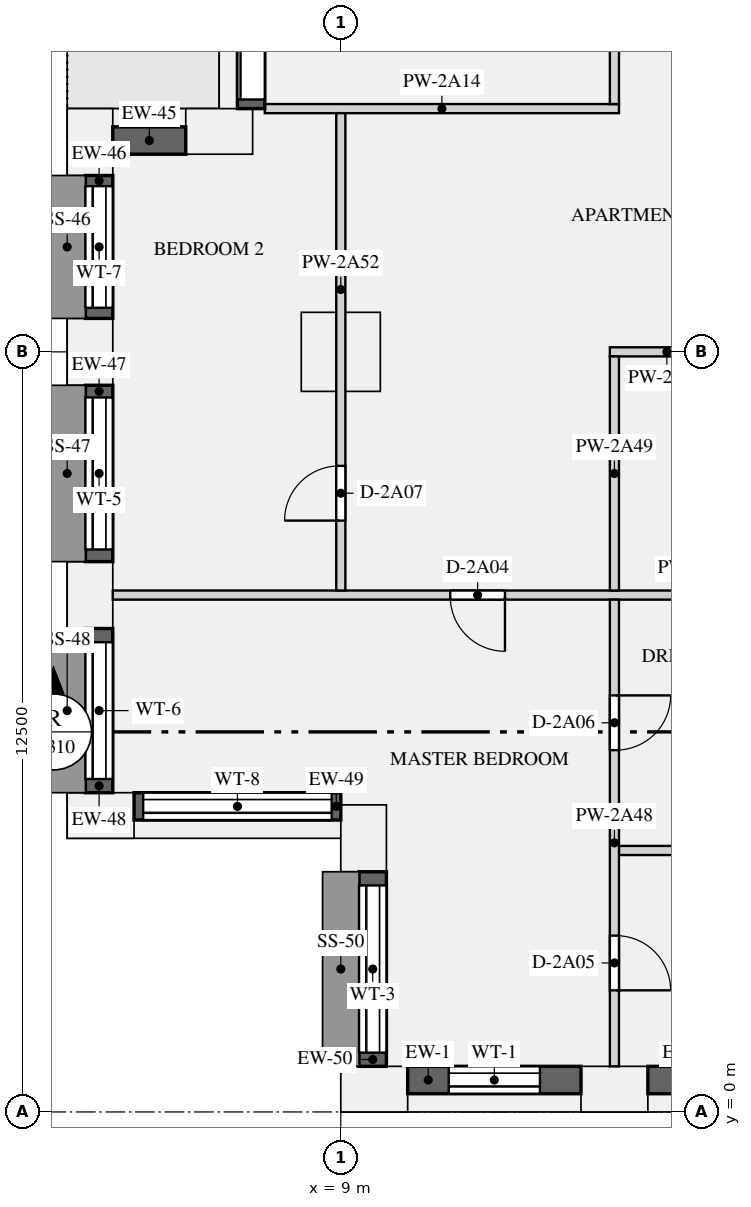
"""IFC4 building model, lengths in metres.
Left out: names, types, materials, properties, quantities, classifications, styles, units other than length and angle.
Written with IfcOpenShell. Run it as: python <this file> out.ifc"""

import sys

from ifc_helpers import new_model, si_unit, direction, frame, frame_2d, origin, origin_2d, place, context, subcontext, project, spatial, rectangle, extrude, element, fill, save


model = new_model("IFC4")
c1 = context("Model", 3, precision=1e-05, world=origin(), true_north=direction((0.0, 1.0)))
c2 = subcontext(c1, "Body", "Model", "MODEL_VIEW")
j1 = project(units=[si_unit("LENGTHUNIT", "METRE"), si_unit("PLANEANGLEUNIT", "RADIAN")], contexts=[c1])
p1 = place(None, origin())
s1 = spatial("IfcSite", under=j1, at=p1, CompositionType="ELEMENT")
p2 = place(p1, origin())
s2 = spatial("IfcBuilding", under=s1, at=p2, CompositionType="ELEMENT")
p3 = place(p2, frame((0.0, 0.0, 83.55)))
s3 = spatial("IfcBuildingStorey", under=s2, at=p3, CompositionType="ELEMENT", Elevation=83.55)
for number, where, z_axis, x_axis in (
    (1, (9.55, 0.375, 0.0), (0.0, 0.0, 1.0), (1.0, 0.0, 0.0)),
    (2, (13.5, 0.375, 0.0), (0.0, 0.0, 1.0), (1.0, 0.0, 0.0)),
    (3, (7.0, 16.125, 0.0), (0.0, 0.0, 1.0), (-1.0, 0.0, 0.0)),
    (4, (4.875, 15.95, 0.0), (0.0, 0.0, 1.0), (0.0, -1.0, 0.0)),
    (5, (4.875, 12.5, 0.0), (0.0, 0.0, 1.0), (0.0, -1.0, 0.0)),
    (6, (4.875, 8.5, 0.0), (0.0, 0.0, 1.0), (0.0, -1.0, 0.0)),
    (7, (5.05, 4.875, 0.0), (0.0, 0.0, 1.0), (1.0, 0.0, 0.0)),
    (8, (9.375, 4.5, 0.0), (0.0, 0.0, 1.0), (0.0, -1.0, 0.0)),
):
    element("IfcColumn", number, at=place(p3, frame(where, z_axis=z_axis, x_axis=x_axis)), inside=s3, PredefinedType="USERDEFINED", context=c2, shape_type="SweptSolid", body=[
        extrude(rectangle(XDim=1.1, YDim=0.75, at=origin_2d()), origin(), (0.0, 0.0, 1.0), 3.15),
    ])
p4 = place(p3, frame((9.0, 12.5, 0.0), z_axis=(0.0, 0.0, 1.0), x_axis=(1.0, 0.0, 0.0)))
e9 = element("IfcColumn", 9, at=p4, inside=s3, PredefinedType="COLUMN", context=c2, shape_type="SweptSolid", body=[
    extrude(rectangle(XDim=1.3, YDim=1.3, at=origin_2d()), origin(), (0.0, 0.0, 1.0), 3.15),
])
p5 = place(p3, frame((10.1, 0.525, 0.9), z_axis=(0.0, 0.0, 1.0), x_axis=(1.0, 0.0, 0.0)))
e10 = element("IfcWall", 10, at=p5, inside=s3, PredefinedType="SOLIDWALL", context=c2, shape_type="SweptSolid", body=[
    extrude(rectangle(XDim=2.85, YDim=0.45, at=frame_2d((1.425, 0.0))), origin(), (0.0, 0.0, 1.0), 1.93),
])
p6 = place(p5, frame((0.675, 0.0, 0.15)))
e11 = element("IfcOpeningElement", 11, at=p6, cuts=e10, PredefinedType="OPENING", context=c2, shape_type="SweptSolid", body=[
    extrude(rectangle(XDim=1.5, YDim=1.5, at=frame_2d((0.75, 0.75))), frame((0.0, 0.235, 0.0), z_axis=(0.0, -1.0, 0.0), x_axis=(1.0, 0.0, 0.0)), (0.0, 0.0, 1.0), 0.47),
])
p7 = place(p3, frame((14.05, 0.525, 0.9), z_axis=(0.0, 0.0, 1.0), x_axis=(1.0, 0.0, 0.0)))
e12 = element("IfcWall", 12, at=p7, inside=s3, PredefinedType="SOLIDWALL", context=c2, shape_type="SweptSolid", body=[
    extrude(rectangle(XDim=3.95, YDim=0.45, at=frame_2d((1.975, 0.0))), origin(), (0.0, 0.0, 1.0), 1.93),
])
p8 = place(p7, frame((1.225, 0.0, 0.15)))
e13 = element("IfcOpeningElement", 13, at=p8, cuts=e12, PredefinedType="OPENING", context=c2, shape_type="SweptSolid", body=[
    extrude(rectangle(XDim=1.5, YDim=1.5, at=frame_2d((0.75, 0.75))), frame((0.0, 0.235, 0.0), z_axis=(0.0, -1.0, 0.0), x_axis=(1.0, 0.0, 0.0)), (0.0, 0.0, 1.0), 0.47),
])
p9 = place(p3, frame((7.525, 19.95, 0.0), z_axis=(0.0, 0.0, 1.0), x_axis=(0.0, -1.0, 0.0)))
e14 = element("IfcWall", 14, at=p9, inside=s3, PredefinedType="SOLIDWALL", context=c2, shape_type="SweptSolid", body=[
    extrude(rectangle(XDim=3.45, YDim=0.45, at=frame_2d((1.725, 0.0))), origin(), (0.0, 0.0, 1.0), 2.83),
])
p10 = place(p9, frame((0.15, 0.0, 0.0)))
e15 = element("IfcOpeningElement", 15, at=p10, cuts=e14, PredefinedType="OPENING", context=c2, shape_type="SweptSolid", body=[
    extrude(rectangle(XDim=3.15, YDim=2.3, at=frame_2d((1.575, 1.15))), frame((0.0, 0.235, 0.0), z_axis=(0.0, -1.0, 0.0), x_axis=(1.0, 0.0, 0.0)), (0.0, 0.0, 1.0), 0.47),
])
p11 = place(p3, frame((6.45, 15.975, 0.9), z_axis=(0.0, 0.0, 1.0), x_axis=(-1.0, 0.0, 0.0)))
e16 = element("IfcWall", 16, at=p11, inside=s3, PredefinedType="SOLIDWALL", context=c2, shape_type="SweptSolid", body=[
    extrude(rectangle(XDim=1.2, YDim=0.45, at=frame_2d((0.6, 0.0))), origin(), (0.0, 0.0, 1.0), 1.93),
])
p12 = place(p3, frame((5.025, 15.4, 0.9), z_axis=(0.0, 0.0, 1.0), x_axis=(0.0, -1.0, 0.0)))
e17 = element("IfcWall", 17, at=p12, inside=s3, PredefinedType="SOLIDWALL", context=c2, shape_type="SweptSolid", body=[
    extrude(rectangle(XDim=2.35, YDim=0.45, at=frame_2d((1.175, 0.0))), origin(), (0.0, 0.0, 1.0), 1.93),
])
p13 = place(p12, frame((0.175, 0.0, 0.15)))
e18 = element("IfcOpeningElement", 18, at=p13, cuts=e17, PredefinedType="OPENING", context=c2, shape_type="SweptSolid", body=[
    extrude(rectangle(XDim=2.0, YDim=1.5, at=frame_2d((1.0, 0.75))), frame((0.0, 0.235, 0.0), z_axis=(0.0, -1.0, 0.0), x_axis=(1.0, 0.0, 0.0)), (0.0, 0.0, 1.0), 0.47),
])
p14 = place(p3, frame((5.025, 11.95, 0.9), z_axis=(0.0, 0.0, 1.0), x_axis=(0.0, -1.0, 0.0)))
e19 = element("IfcWall", 19, at=p14, inside=s3, PredefinedType="SOLIDWALL", context=c2, shape_type="SweptSolid", body=[
    extrude(rectangle(XDim=2.9, YDim=0.45, at=frame_2d((1.45, 0.0))), origin(), (0.0, 0.0, 1.0), 1.93),
])
p15 = place(p14, frame((0.2, 0.0, 0.15)))
e20 = element("IfcOpeningElement", 20, at=p15, cuts=e19, PredefinedType="OPENING", context=c2, shape_type="SweptSolid", body=[
    extrude(rectangle(XDim=2.5, YDim=1.5, at=frame_2d((1.25, 0.75))), frame((0.0, 0.235, 0.0), z_axis=(0.0, -1.0, 0.0), x_axis=(1.0, 0.0, 0.0)), (0.0, 0.0, 1.0), 0.47),
])
p16 = place(p3, frame((5.025, 7.95, 0.9), z_axis=(0.0, 0.0, 1.0), x_axis=(0.0, -1.0, 0.0)))
e21 = element("IfcWall", 21, at=p16, inside=s3, PredefinedType="SOLIDWALL", context=c2, shape_type="SweptSolid", body=[
    extrude(rectangle(XDim=2.7, YDim=0.45, at=frame_2d((1.35, 0.0))), origin(), (0.0, 0.0, 1.0), 1.93),
])
p17 = place(p16, frame((0.225, 0.0, 0.15)))
e22 = element("IfcOpeningElement", 22, at=p17, cuts=e21, PredefinedType="OPENING", context=c2, shape_type="SweptSolid", body=[
    extrude(rectangle(XDim=2.25, YDim=1.5, at=frame_2d((1.125, 0.75))), frame((0.0, 0.235, 0.0), z_axis=(0.0, -1.0, 0.0), x_axis=(1.0, 0.0, 0.0)), (0.0, 0.0, 1.0), 0.47),
])
p18 = place(p3, frame((5.6, 5.025, 0.9), z_axis=(0.0, 0.0, 1.0), x_axis=(1.0, 0.0, 0.0)))
e23 = element("IfcWall", 23, at=p18, inside=s3, PredefinedType="SOLIDWALL", context=c2, shape_type="SweptSolid", body=[
    extrude(rectangle(XDim=3.4, YDim=0.45, at=frame_2d((1.7, 0.0))), origin(), (0.0, 0.0, 1.0), 1.93),
])
p19 = place(p18, frame((0.15, 0.0, 0.15)))
e24 = element("IfcOpeningElement", 24, at=p19, cuts=e23, PredefinedType="OPENING", context=c2, shape_type="SweptSolid", body=[
    extrude(rectangle(XDim=3.1, YDim=1.5, at=frame_2d((1.55, 0.75))), frame((0.0, 0.235, 0.0), z_axis=(0.0, -1.0, 0.0), x_axis=(1.0, 0.0, 0.0)), (0.0, 0.0, 1.0), 0.47),
])
p20 = place(p3, frame((9.525, 3.95, 0.9), z_axis=(0.0, 0.0, 1.0), x_axis=(0.0, -1.0, 0.0)))
e25 = element("IfcWall", 25, at=p20, inside=s3, PredefinedType="SOLIDWALL", context=c2, shape_type="SweptSolid", body=[
    extrude(rectangle(XDim=3.2, YDim=0.45, at=frame_2d((1.6, 0.0))), origin(), (0.0, 0.0, 1.0), 1.93),
])
p21 = place(p20, frame((0.225, 0.0, 0.15)))
e26 = element("IfcOpeningElement", 26, at=p21, cuts=e25, PredefinedType="OPENING", context=c2, shape_type="SweptSolid", body=[
    extrude(rectangle(XDim=2.75, YDim=1.5, at=frame_2d((1.375, 0.75))), frame((0.0, 0.235, 0.0), z_axis=(0.0, -1.0, 0.0), x_axis=(1.0, 0.0, 0.0)), (0.0, 0.0, 1.0), 0.47),
])
p22 = place(p3, frame((5.25, 8.5, 0.0), z_axis=(0.0, 0.0, 1.0), x_axis=(1.0, 0.0, 0.0)))
e27 = element("IfcWall", 27, at=p22, inside=s3, PredefinedType="PARTITIONING", context=c2, shape_type="SweptSolid", body=[
    extrude(rectangle(XDim=12.75, YDim=0.15, at=frame_2d((6.375, 0.0))), origin(), (0.0, 0.0, 1.0), 2.83),
])
p23 = place(p22, frame((5.55, 0.0, 0.0)))
e28 = element("IfcOpeningElement", 28, at=p23, cuts=e27, PredefinedType="OPENING", context=c2, shape_type="SweptSolid", body=[
    extrude(rectangle(XDim=0.9, YDim=2.1, at=frame_2d((0.45, 1.05))), frame((0.0, 0.085, 0.0), z_axis=(0.0, -1.0, 0.0), x_axis=(1.0, 0.0, 0.0)), (0.0, 0.0, 1.0), 0.17),
])
p24 = place(p3, frame((13.575, 4.3, 0.0), z_axis=(0.0, 0.0, 1.0), x_axis=(1.0, 0.0, 0.0)))
e29 = element("IfcWall", 29, at=p24, inside=s3, PredefinedType="PARTITIONING", context=c2, shape_type="SweptSolid", body=[
    extrude(rectangle(XDim=4.425, YDim=0.15, at=frame_2d((2.212, 0.0))), origin(), (0.0, 0.0, 1.0), 2.83),
])
p25 = place(p3, frame((7.75, 16.5, 0.0), z_axis=(0.0, 0.0, 1.0), x_axis=(1.0, 0.0, 0.0)))
e30 = element("IfcWall", 30, at=p25, inside=s3, PredefinedType="PARTITIONING", context=c2, shape_type="SweptSolid", body=[
    extrude(rectangle(XDim=5.825, YDim=0.15, at=frame_2d((2.913, 0.0))), origin(), (0.0, 0.0, 1.0), 2.83),
])
p26 = place(p3, frame((13.425, 12.5, 0.0), z_axis=(0.0, 0.0, 1.0), x_axis=(1.0, 0.0, 0.0)))
e31 = element("IfcWall", 31, at=p26, inside=s3, PredefinedType="PARTITIONING", context=c2, shape_type="SweptSolid", body=[
    extrude(rectangle(XDim=4.575, YDim=0.15, at=frame_2d((2.288, 0.0))), origin(), (0.0, 0.0, 1.0), 2.83),
])
p27 = place(p26, frame((1.875, 0.0, 0.0)))
e32 = element("IfcOpeningElement", 32, at=p27, cuts=e31, PredefinedType="OPENING", context=c2, shape_type="SweptSolid", body=[
    extrude(rectangle(XDim=0.9, YDim=2.1, at=frame_2d((0.45, 1.05))), frame((0.0, 0.085, 0.0), z_axis=(0.0, -1.0, 0.0), x_axis=(1.0, 0.0, 0.0)), (0.0, 0.0, 1.0), 0.17),
])
p28 = place(p3, frame((13.5, 0.75, 0.0), z_axis=(0.0, 0.0, 1.0), x_axis=(0.0, 1.0, 0.0)))
e33 = element("IfcWall", 33, at=p28, inside=s3, PredefinedType="PARTITIONING", context=c2, shape_type="SweptSolid", body=[
    extrude(rectangle(XDim=7.675, YDim=0.15, at=frame_2d((3.837, 0.0))), origin(), (0.0, 0.0, 1.0), 2.83),
])
p29 = place(p28, frame((1.25, 0.0, 0.0)))
e34 = element("IfcOpeningElement", 34, at=p29, cuts=e33, PredefinedType="OPENING", context=c2, shape_type="SweptSolid", body=[
    extrude(rectangle(XDim=0.9, YDim=2.1, at=frame_2d((0.45, 1.05))), frame((0.0, 0.085, 0.0), z_axis=(0.0, -1.0, 0.0), x_axis=(1.0, 0.0, 0.0)), (0.0, 0.0, 1.0), 0.17),
])
p30 = place(p28, frame((5.2, 0.0, 0.0)))
e35 = element("IfcOpeningElement", 35, at=p30, cuts=e33, PredefinedType="OPENING", context=c2, shape_type="SweptSolid", body=[
    extrude(rectangle(XDim=0.9, YDim=2.1, at=frame_2d((0.45, 1.05))), frame((0.0, 0.085, 0.0), z_axis=(0.0, -1.0, 0.0), x_axis=(1.0, 0.0, 0.0)), (0.0, 0.0, 1.0), 0.17),
])
p31 = place(p3, frame((13.5, 8.575, 0.0), z_axis=(0.0, 0.0, 1.0), x_axis=(0.0, 1.0, 0.0)))
e36 = element("IfcWall", 36, at=p31, inside=s3, PredefinedType="PARTITIONING", context=c2, shape_type="SweptSolid", body=[
    extrude(rectangle(XDim=3.85, YDim=0.15, at=frame_2d((1.925, 0.0))), origin(), (0.0, 0.0, 1.0), 2.83),
])
p32 = place(p3, frame((13.5, 16.575, 0.0), z_axis=(0.0, 0.0, 1.0), x_axis=(0.0, 1.0, 0.0)))
e37 = element("IfcWall", 37, at=p32, inside=s3, PredefinedType="PARTITIONING", context=c2, shape_type="SweptSolid", body=[
    extrude(rectangle(XDim=6.325, YDim=0.15, at=frame_2d((3.163, 0.0))), origin(), (0.0, 0.0, 1.0), 2.83),
])
p33 = place(p32, frame((2.45, 0.0, 0.0)))
e38 = element("IfcOpeningElement", 38, at=p33, cuts=e37, PredefinedType="OPENING", context=c2, shape_type="SweptSolid", body=[
    extrude(rectangle(XDim=1.5, YDim=2.1, at=frame_2d((0.75, 1.05))), frame((0.0, 0.085, 0.0), z_axis=(0.0, -1.0, 0.0), x_axis=(1.0, 0.0, 0.0)), (0.0, 0.0, 1.0), 0.17),
])
p34 = place(p3, frame((9.0, 8.575, 0.0), z_axis=(0.0, 0.0, 1.0), x_axis=(0.0, 1.0, 0.0)))
e39 = element("IfcWall", 39, at=p34, inside=s3, PredefinedType="PARTITIONING", context=c2, shape_type="SweptSolid", body=[
    extrude(rectangle(XDim=7.85, YDim=0.15, at=frame_2d((3.925, 0.0))), origin(), (0.0, 0.0, 1.0), 2.83),
])
p35 = place(p34, frame((1.15, 0.0, 0.0)))
e40 = element("IfcOpeningElement", 40, at=p35, cuts=e39, PredefinedType="OPENING", context=c2, shape_type="SweptSolid", body=[
    extrude(rectangle(XDim=0.9, YDim=2.1, at=frame_2d((0.45, 1.05))), frame((0.0, 0.085, 0.0), z_axis=(0.0, -1.0, 0.0), x_axis=(1.0, 0.0, 0.0)), (0.0, 0.0, 1.0), 0.17),
])
p36 = place(p6, origin())
e41 = element("IfcWindow", 41, at=p36, inside=s3, PartitioningType="SINGLE_PANEL", PredefinedType="WINDOW", context=c2, shape_type="SweptSolid", body=[
    extrude(rectangle(XDim=1.5, YDim=1.5, at=frame_2d((0.75, 0.75))), frame((0.0, -0.065, 0.0), z_axis=(0.0, -1.0, 0.0), x_axis=(1.0, 0.0, 0.0)), (0.0, 0.0, 1.0), 0.06),
])
fill(e11, e41)
p37 = place(p10, origin())
e42 = element("IfcDoor", 42, at=p37, inside=s3, OperationType="SLIDING_TO_LEFT", PredefinedType="DOOR", context=c2, shape_type="SweptSolid", body=[
    extrude(rectangle(XDim=3.15, YDim=2.3, at=frame_2d((1.575, 1.15))), frame((0.0, -0.07, 0.0), z_axis=(0.0, -1.0, 0.0), x_axis=(1.0, 0.0, 0.0)), (0.0, 0.0, 1.0), 0.05),
])
fill(e15, e42)
p38 = place(p13, origin())
e43 = element("IfcWindow", 43, at=p38, inside=s3, PartitioningType="SINGLE_PANEL", PredefinedType="WINDOW", context=c2, shape_type="SweptSolid", body=[
    extrude(rectangle(XDim=2.0, YDim=1.5, at=frame_2d((1.0, 0.75))), frame((0.0, -0.065, 0.0), z_axis=(0.0, -1.0, 0.0), x_axis=(1.0, 0.0, 0.0)), (0.0, 0.0, 1.0), 0.06),
])
fill(e18, e43)
p39 = place(p15, origin())
e44 = element("IfcWindow", 44, at=p39, inside=s3, PartitioningType="SINGLE_PANEL", PredefinedType="WINDOW", context=c2, shape_type="SweptSolid", body=[
    extrude(rectangle(XDim=2.5, YDim=1.5, at=frame_2d((1.25, 0.75))), frame((0.0, -0.065, 0.0), z_axis=(0.0, -1.0, 0.0), x_axis=(1.0, 0.0, 0.0)), (0.0, 0.0, 1.0), 0.06),
])
fill(e20, e44)
p40 = place(p17, origin())
e45 = element("IfcWindow", 45, at=p40, inside=s3, PartitioningType="SINGLE_PANEL", PredefinedType="WINDOW", context=c2, shape_type="SweptSolid", body=[
    extrude(rectangle(XDim=2.25, YDim=1.5, at=frame_2d((1.125, 0.75))), frame((0.0, -0.065, 0.0), z_axis=(0.0, -1.0, 0.0), x_axis=(1.0, 0.0, 0.0)), (0.0, 0.0, 1.0), 0.06),
])
fill(e22, e45)
p41 = place(p19, origin())
e46 = element("IfcWindow", 46, at=p41, inside=s3, PartitioningType="SINGLE_PANEL", PredefinedType="WINDOW", context=c2, shape_type="SweptSolid", body=[
    extrude(rectangle(XDim=3.1, YDim=1.5, at=frame_2d((1.55, 0.75))), frame((0.0, -0.065, 0.0), z_axis=(0.0, -1.0, 0.0), x_axis=(1.0, 0.0, 0.0)), (0.0, 0.0, 1.0), 0.06),
])
fill(e24, e46)
p42 = place(p21, origin())
e47 = element("IfcWindow", 47, at=p42, inside=s3, PartitioningType="SINGLE_PANEL", PredefinedType="WINDOW", context=c2, shape_type="SweptSolid", body=[
    extrude(rectangle(XDim=2.75, YDim=1.5, at=frame_2d((1.375, 0.75))), frame((0.0, -0.065, 0.0), z_axis=(0.0, -1.0, 0.0), x_axis=(1.0, 0.0, 0.0)), (0.0, 0.0, 1.0), 0.06),
])
fill(e26, e47)
p43 = place(p23, frame((0.9, 0.0, 0.0), z_axis=(0.0, 0.0, 1.0), x_axis=(-1.0, 0.0, 0.0)))
e48 = element("IfcDoor", 48, at=p43, inside=s3, OperationType="SINGLE_SWING_LEFT", PredefinedType="DOOR", context=c2, shape_type="SweptSolid", body=[
    extrude(rectangle(XDim=0.9, YDim=2.1, at=frame_2d((0.45, 1.05))), frame((0.0, 0.025, 0.0), z_axis=(0.0, -1.0, 0.0), x_axis=(1.0, 0.0, 0.0)), (0.0, 0.0, 1.0), 0.05),
])
fill(e28, e48)
p44 = place(p29, frame((0.9, 0.0, 0.0), z_axis=(0.0, 0.0, 1.0), x_axis=(-1.0, 0.0, 0.0)))
e49 = element("IfcDoor", 49, at=p44, inside=s3, OperationType="SINGLE_SWING_RIGHT", PredefinedType="DOOR", context=c2, shape_type="SweptSolid", body=[
    extrude(rectangle(XDim=0.9, YDim=2.1, at=frame_2d((0.45, 1.05))), frame((0.0, 0.025, 0.0), z_axis=(0.0, -1.0, 0.0), x_axis=(1.0, 0.0, 0.0)), (0.0, 0.0, 1.0), 0.05),
])
fill(e34, e49)
p45 = place(p30, frame((0.9, 0.0, 0.0), z_axis=(0.0, 0.0, 1.0), x_axis=(-1.0, 0.0, 0.0)))
e50 = element("IfcDoor", 50, at=p45, inside=s3, OperationType="SINGLE_SWING_LEFT", PredefinedType="DOOR", context=c2, shape_type="SweptSolid", body=[
    extrude(rectangle(XDim=0.9, YDim=2.1, at=frame_2d((0.45, 1.05))), frame((0.0, 0.025, 0.0), z_axis=(0.0, -1.0, 0.0), x_axis=(1.0, 0.0, 0.0)), (0.0, 0.0, 1.0), 0.05),
])
fill(e35, e50)
p46 = place(p35, origin())
e51 = element("IfcDoor", 51, at=p46, inside=s3, OperationType="SINGLE_SWING_LEFT", PredefinedType="DOOR", context=c2, shape_type="SweptSolid", body=[
    extrude(rectangle(XDim=0.9, YDim=2.1, at=frame_2d((0.45, 1.05))), frame((0.0, 0.025, 0.0), z_axis=(0.0, -1.0, 0.0), x_axis=(1.0, 0.0, 0.0)), (0.0, 0.0, 1.0), 0.05),
])
fill(e40, e51)
save(model, sys.argv[1])
